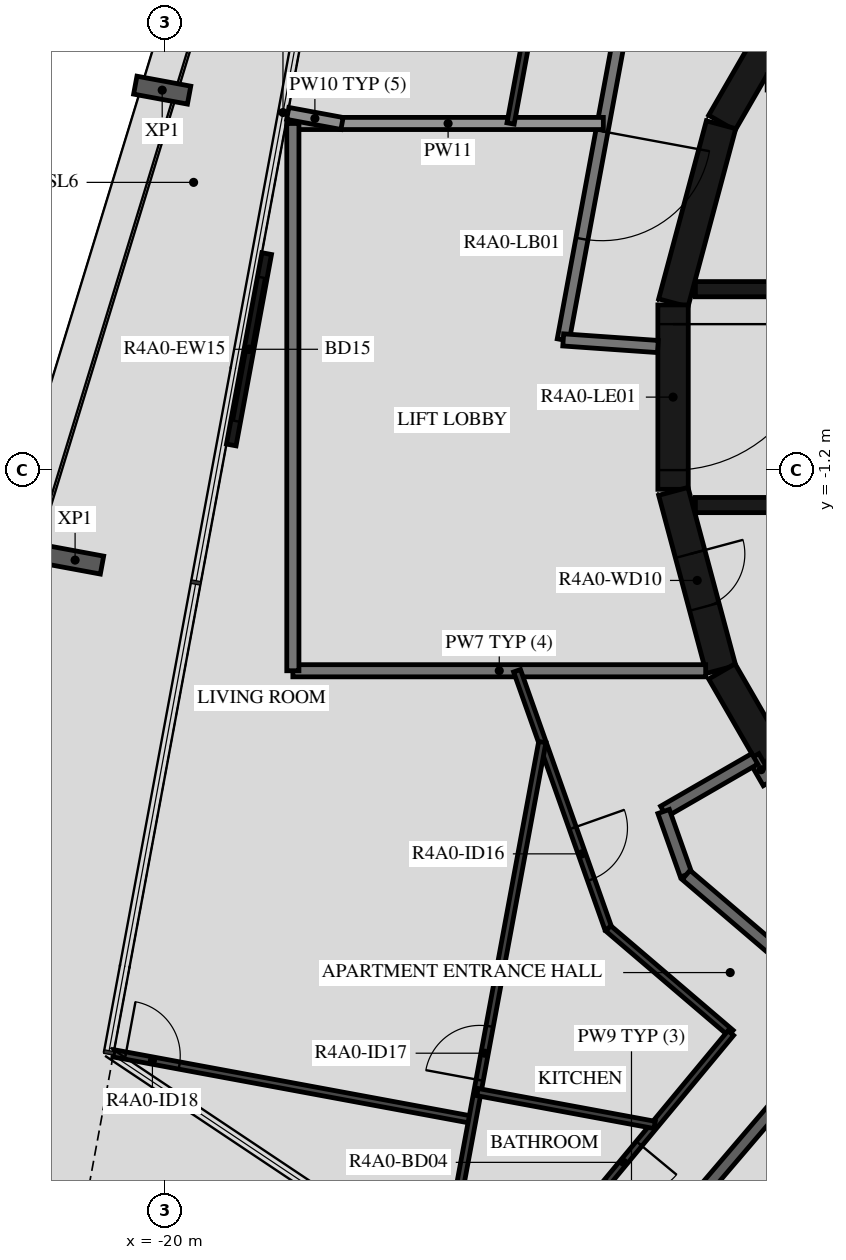
"""IFC4 building model, lengths in metres.
Left out: names, types, materials, properties, quantities, classifications, styles, units other than length and angle.
Written with IfcOpenShell. Run it as: python <this file> out.ifc"""

import sys

from ifc_helpers import new_model, si_unit, direction, frame, frame_2d, origin, origin_2d, place, context, subcontext, project, spatial, rectangle, i_section, extrude, element, fill, save


model = new_model("IFC4")
c1 = context("Model", 3, precision=1e-05, world=origin(), true_north=direction((0.0, 1.0)))
c2 = subcontext(c1, "Body", "Model", "MODEL_VIEW")
j1 = project(units=[si_unit("LENGTHUNIT", "METRE"), si_unit("PLANEANGLEUNIT", "RADIAN")], contexts=[c1])
p1 = place(None, origin())
s1 = spatial("IfcSite", under=j1, at=p1, CompositionType="ELEMENT")
p2 = place(p1, origin())
s2 = spatial("IfcBuilding", under=s1, at=p2, CompositionType="ELEMENT")
p3 = place(p2, frame((0.0, 0.0, 151.7)))
s3 = spatial("IfcBuildingStorey", under=s2, at=p3, CompositionType="ELEMENT", Elevation=151.7)
for number, where, z_axis, x_axis in (
    (1, (-20.049, 5.048, -0.45), (0.0, 0.0, 1.0), (0.182, 0.983, 0.0)),
    (2, (-21.481, -2.68, -0.45), (0.0, 0.0, 1.0), (0.182, 0.983, 0.0)),
):
    element("IfcColumn", number, at=place(p3, frame(where, z_axis=z_axis, x_axis=x_axis)), inside=s3, PredefinedType="COLUMN", context=c2, shape_type="SweptSolid", body=[
        extrude(i_section(OverallWidth=0.3, OverallDepth=0.9, WebThickness=0.019, FlangeThickness=0.035, FilletRadius=0.03, at=origin_2d()), origin(), (0.0, 0.0, 1.0), 3.57),
    ])
p4 = place(p3, frame((-18.33, 2.36, 0.0), z_axis=(0.0, 0.0, 1.0), x_axis=(-0.18226136951, -0.983250117307, 0.0)))
e3 = element("IfcWall", 3, at=p4, inside=s3, PredefinedType="STANDARD", context=c2, shape_type="SweptSolid", body=[
    extrude(rectangle(XDim=3.2, YDim=0.16, at=frame_2d((1.6, 0.0))), origin(), (0.0, 0.0, 1.0), 3.12),
])
p5 = place(p4, frame((0.4, 0.0, 0.0)))
e4 = element("IfcOpeningElement", 4, at=p5, cuts=e3, PredefinedType="OPENING", context=c2, shape_type="SweptSolid", body=[
    extrude(rectangle(XDim=2.4, YDim=2.4, at=frame_2d((1.2, 1.2))), frame((0.0, 0.09, 0.0), z_axis=(0.0, -1.0, 0.0), x_axis=(1.0, 0.0, 0.0)), (0.0, 0.0, 1.0), 0.18),
])
for number, where, z_axis, x_axis in (
    (5, (-9.329, 7.137, 0.0), (0.0, 0.0, 1.0), (-0.5, -0.866, 0.0)),
    (6, (-10.858, 4.479, 0.0), (0.0, 0.0, 1.0), (-0.259, -0.966, 0.0)),
):
    element("IfcWall", number, at=place(p3, frame(where, z_axis=z_axis, x_axis=x_axis)), inside=s3, PredefinedType="SHEAR", context=c2, shape_type="SweptSolid", body=[
        extrude(rectangle(XDim=3.033, YDim=0.5, at=frame_2d((1.516, 0.0))), origin(), (0.0, 0.0, 1.0), 3.12),
    ])
p6 = place(p3, frame((-11.647, 1.516, 0.0), z_axis=(0.0, 0.0, 1.0), x_axis=(0.0, -1.0, 0.0)))
e7 = element("IfcWall", 7, at=p6, inside=s3, PredefinedType="SHEAR", context=c2, shape_type="SweptSolid", body=[
    extrude(rectangle(XDim=3.033, YDim=0.5, at=frame_2d((1.516, 0.0))), origin(), (0.0, 0.0, 1.0), 3.12),
])
p7 = place(p6, frame((0.316, 0.0, 0.0)))
e8 = element("IfcOpeningElement", 8, at=p7, cuts=e7, PredefinedType="OPENING", context=c2, shape_type="SweptSolid", body=[
    extrude(rectangle(XDim=2.4, YDim=2.1, at=frame_2d((1.2, 1.05))), frame((0.0, 0.26, 0.0), z_axis=(0.0, -1.0, 0.0), x_axis=(1.0, 0.0, 0.0)), (0.0, 0.0, 1.0), 0.52),
])
p8 = place(p3, frame((-11.643, -1.55, 0.0), z_axis=(0.0, 0.0, 1.0), x_axis=(0.258734743916, -0.965948410781, 0.0)))
e9 = element("IfcWall", 9, at=p8, inside=s3, PredefinedType="SHEAR", context=c2, shape_type="SweptSolid", body=[
    extrude(rectangle(XDim=3.033, YDim=0.5, at=frame_2d((1.516, 0.0))), origin(), (0.0, 0.0, 1.0), 3.12),
])
p9 = place(p8, frame((1.066, 0.0, 0.0)))
e10 = element("IfcOpeningElement", 10, at=p9, cuts=e9, PredefinedType="OPENING", context=c2, shape_type="SweptSolid", body=[
    extrude(rectangle(XDim=0.9, YDim=2.1, at=frame_2d((0.45, 1.05))), frame((0.0, 0.26, 0.0), z_axis=(0.0, -1.0, 0.0), x_axis=(1.0, 0.0, 0.0)), (0.0, 0.0, 1.0), 0.52),
])
p10 = place(p3, frame((-10.845, -4.51, 0.0), z_axis=(0.0, 0.0, 1.0), x_axis=(0.500087131594, -0.865975092491, 0.0)))
e11 = element("IfcWall", 11, at=p10, inside=s3, PredefinedType="SHEAR", context=c2, shape_type="SweptSolid", body=[
    extrude(rectangle(XDim=3.033, YDim=0.5, at=frame_2d((1.516, 0.0))), origin(), (0.0, 0.0, 1.0), 3.12),
])
p11 = place(p3, frame((-11.28, 1.775, 0.0), z_axis=(0.0, 0.0, 1.0), x_axis=(1.0, 0.0, 0.0)))
e12 = element("IfcWall", 12, at=p11, inside=s3, PredefinedType="SHEAR", context=c2, shape_type="SweptSolid", body=[
    extrude(rectangle(XDim=14.38, YDim=0.25, at=frame_2d((7.19, 0.0))), origin(), (0.0, 0.0, 1.0), 3.12),
])
p12 = place(p11, frame((10.73, 0.0, 0.0)))
e13 = element("IfcOpeningElement", 13, at=p12, cuts=e12, PredefinedType="OPENING", context=c2, shape_type="SweptSolid", body=[
    extrude(rectangle(XDim=1.1, YDim=2.1, at=frame_2d((0.55, 1.05))), frame((0.0, 0.135, 0.0), z_axis=(0.0, -1.0, 0.0), x_axis=(1.0, 0.0, 0.0)), (0.0, 0.0, 1.0), 0.27),
])
p13 = place(p11, frame((12.88, 0.0, 0.0)))
e14 = element("IfcOpeningElement", 14, at=p13, cuts=e12, PredefinedType="OPENING", context=c2, shape_type="SweptSolid", body=[
    extrude(rectangle(XDim=1.1, YDim=2.1, at=frame_2d((0.55, 1.05))), frame((0.0, 0.135, 0.0), z_axis=(0.0, -1.0, 0.0), x_axis=(1.0, 0.0, 0.0)), (0.0, 0.0, 1.0), 0.27),
])
p14 = place(p11, frame((5.455, 0.0, 0.0)))
e15 = element("IfcOpeningElement", 15, at=p14, cuts=e12, PredefinedType="OPENING", context=c2, shape_type="SweptSolid", body=[
    extrude(rectangle(XDim=0.9, YDim=2.1, at=frame_2d((0.45, 1.05))), frame((0.0, 0.135, 0.0), z_axis=(0.0, -1.0, 0.0), x_axis=(1.0, 0.0, 0.0)), (0.0, 0.0, 1.0), 0.27),
])
p15 = place(p3, frame((-11.28, -1.775, 0.0), z_axis=(0.0, 0.0, 1.0), x_axis=(1.0, 0.0, 0.0)))
e16 = element("IfcWall", 16, at=p15, inside=s3, PredefinedType="SHEAR", context=c2, shape_type="SweptSolid", body=[
    extrude(rectangle(XDim=14.38, YDim=0.25, at=frame_2d((7.19, 0.0))), origin(), (0.0, 0.0, 1.0), 3.12),
])
p16 = place(p15, frame((2.03, 0.0, 0.0)))
e17 = element("IfcOpeningElement", 17, at=p16, cuts=e16, PredefinedType="OPENING", context=c2, shape_type="SweptSolid", body=[
    extrude(rectangle(XDim=1.3, YDim=2.1, at=frame_2d((0.65, 1.05))), frame((0.0, 0.135, 0.0), z_axis=(0.0, -1.0, 0.0), x_axis=(1.0, 0.0, 0.0)), (0.0, 0.0, 1.0), 0.27),
])
p17 = place(p15, frame((4.18, 0.0, 0.0)))
e18 = element("IfcOpeningElement", 18, at=p17, cuts=e16, PredefinedType="OPENING", context=c2, shape_type="SweptSolid", body=[
    extrude(rectangle(XDim=1.3, YDim=2.1, at=frame_2d((0.65, 1.05))), frame((0.0, 0.135, 0.0), z_axis=(0.0, -1.0, 0.0), x_axis=(1.0, 0.0, 0.0)), (0.0, 0.0, 1.0), 0.27),
])
p18 = place(p15, frame((12.88, 0.0, 0.0)))
e19 = element("IfcOpeningElement", 19, at=p18, cuts=e16, PredefinedType="OPENING", context=c2, shape_type="SweptSolid", body=[
    extrude(rectangle(XDim=1.1, YDim=2.1, at=frame_2d((0.55, 1.05))), frame((0.0, 0.135, 0.0), z_axis=(0.0, -1.0, 0.0), x_axis=(1.0, 0.0, 0.0)), (0.0, 0.0, 1.0), 0.27),
])
p19 = place(p15, frame((6.53, 0.0, 0.0)))
e20 = element("IfcOpeningElement", 20, at=p19, cuts=e16, PredefinedType="OPENING", context=c2, shape_type="SweptSolid", body=[
    extrude(rectangle(XDim=0.9, YDim=2.1, at=frame_2d((0.45, 1.05))), frame((0.0, 0.135, 0.0), z_axis=(0.0, -1.0, 0.0), x_axis=(1.0, 0.0, 0.0)), (0.0, 0.0, 1.0), 0.27),
])
p20 = place(p15, frame((8.68, 0.0, 0.0)))
e21 = element("IfcOpeningElement", 21, at=p20, cuts=e16, PredefinedType="OPENING", context=c2, shape_type="SweptSolid", body=[
    extrude(rectangle(XDim=0.9, YDim=2.1, at=frame_2d((0.45, 1.05))), frame((0.0, 0.135, 0.0), z_axis=(0.0, -1.0, 0.0), x_axis=(1.0, 0.0, 0.0)), (0.0, 0.0, 1.0), 0.27),
])
p21 = place(p15, frame((10.83, 0.0, 0.0)))
e22 = element("IfcOpeningElement", 22, at=p21, cuts=e16, PredefinedType="OPENING", context=c2, shape_type="SweptSolid", body=[
    extrude(rectangle(XDim=0.9, YDim=2.1, at=frame_2d((0.45, 1.05))), frame((0.0, 0.135, 0.0), z_axis=(0.0, -1.0, 0.0), x_axis=(1.0, 0.0, 0.0)), (0.0, 0.0, 1.0), 0.27),
])
p22 = place(p3, frame((-12.521, 5.972, 0.0), z_axis=(0.0, 0.0, 1.0), x_axis=(-0.182251559718, -0.983251935661, 0.0)))
e23 = element("IfcWall", 23, at=p22, inside=s3, PredefinedType="STANDARD", context=c2, shape_type="SweptSolid", body=[
    extrude(rectangle(XDim=5.117, YDim=0.2, at=frame_2d((2.559, 0.0))), origin(), (0.0, 0.0, 1.0), 3.12),
])
p23 = place(p22, frame((1.627, 0.0, 0.0)))
e24 = element("IfcOpeningElement", 24, at=p23, cuts=e23, PredefinedType="OPENING", context=c2, shape_type="SweptSolid", body=[
    extrude(rectangle(XDim=1.8, YDim=2.1, at=frame_2d((0.9, 1.05))), frame((0.0, 0.11, 0.0), z_axis=(0.0, -1.0, 0.0), x_axis=(1.0, 0.0, 0.0)), (0.0, 0.0, 1.0), 0.22),
])
p24 = place(p3, frame((-13.454, 0.941, 0.0), z_axis=(0.0, 0.0, 1.0), x_axis=(0.99755155062, -0.069934997354, 0.0)))
e25 = element("IfcWall", 25, at=p24, inside=s3, PredefinedType="STANDARD", context=c2, shape_type="SweptSolid", body=[
    extrude(rectangle(XDim=1.561, YDim=0.2, at=frame_2d((0.78, 0.0))), origin(), (0.0, 0.0, 1.0), 3.12),
])
p25 = place(p3, frame((-10.323, -5.914, 0.0), z_axis=(0.0, 0.0, 1.0), x_axis=(0.500137201729, -0.865946175837, 0.0)))
e26 = element("IfcWall", 26, at=p25, inside=s3, PredefinedType="STANDARD", context=c2, shape_type="SweptSolid", body=[
    extrude(rectangle(XDim=0.492, YDim=0.2, at=frame_2d((0.246, 0.0))), origin(), (0.0, 0.0, 1.0), 3.12),
])
p26 = place(p3, frame((-10.303, -5.949, 0.0), z_axis=(0.0, 0.0, 1.0), x_axis=(-0.866021168401, -0.500007335828, 0.0)))
e27 = element("IfcWall", 27, at=p26, inside=s3, PredefinedType="STANDARD", context=c2, shape_type="SweptSolid", body=[
    extrude(rectangle(XDim=1.731, YDim=0.2, at=frame_2d((0.865, 0.0))), origin(), (0.0, 0.0, 1.0), 3.12),
])
p27 = place(p3, frame((-11.802, -6.814, 0.0), z_axis=(0.0, 0.0, 1.0), x_axis=(0.333904297771, -0.942606980629, 0.0)))
e28 = element("IfcWall", 28, at=p27, inside=s3, PredefinedType="STANDARD", context=c2, shape_type="SweptSolid", body=[
    extrude(rectangle(XDim=1.107, YDim=0.2, at=frame_2d((0.553, 0.0))), origin(), (0.0, 0.0, 1.0), 3.12),
])
p28 = place(p3, frame((-11.433, -7.858, 0.0), z_axis=(0.0, 0.0, 1.0), x_axis=(0.760412154545, -0.649440801937, 0.0)))
e29 = element("IfcWall", 29, at=p28, inside=s3, PredefinedType="STANDARD", context=c2, shape_type="SweptSolid", body=[
    extrude(rectangle(XDim=7.181, YDim=0.2, at=frame_2d((3.59, 0.0))), origin(), (0.0, 0.0, 1.0), 3.12),
])
p29 = place(p28, frame((2.39, 0.0, 0.0)))
e30 = element("IfcOpeningElement", 30, at=p29, cuts=e29, PredefinedType="OPENING", context=c2, shape_type="SweptSolid", body=[
    extrude(rectangle(XDim=1.0, YDim=2.1, at=frame_2d((0.5, 1.05))), frame((0.0, 0.11, 0.0), z_axis=(0.0, -1.0, 0.0), x_axis=(1.0, 0.0, 0.0)), (0.0, 0.0, 1.0), 0.22),
])
p30 = place(p3, frame((-12.794, 4.5, 0.0), z_axis=(0.0, 0.0, 1.0), x_axis=(-1.0, 0.0, 0.0)))
e31 = element("IfcWall", 31, at=p30, inside=s3, PredefinedType="STANDARD", context=c2, shape_type="SweptSolid", body=[
    extrude(rectangle(XDim=5.106, YDim=0.2, at=frame_2d((2.553, 0.0))), origin(), (0.0, 0.0, 1.0), 2.73),
])
p31 = place(p3, frame((-17.9, -4.5, 0.0), z_axis=(0.0, 0.0, 1.0), x_axis=(1.0, 0.0, 0.0)))
e32 = element("IfcWall", 32, at=p31, inside=s3, PredefinedType="STANDARD", context=c2, shape_type="SweptSolid", body=[
    extrude(rectangle(XDim=6.789, YDim=0.2, at=frame_2d((3.394, 0.0))), origin(), (0.0, 0.0, 1.0), 3.12),
])
p32 = place(p3, frame((-17.9, 4.5, 0.0), z_axis=(0.0, 0.0, 1.0), x_axis=(0.0, -1.0, 0.0)))
e33 = element("IfcWall", 33, at=p32, inside=s3, PredefinedType="STANDARD", context=c2, shape_type="SweptSolid", body=[
    extrude(rectangle(XDim=9.0, YDim=0.2, at=frame_2d((4.5, 0.0))), origin(), (0.0, 0.0, 1.0), 3.12),
])
p33 = place(p3, frame((-17.984, 4.665, 0.0), z_axis=(0.0, 0.0, 1.0), x_axis=(0.98328378843, -0.182079629313, 0.0)))
e34 = element("IfcWall", 34, at=p33, inside=s3, PredefinedType="STANDARD", context=c2, shape_type="SweptSolid", body=[
    extrude(rectangle(XDim=0.908, YDim=0.2, at=frame_2d((0.454, 0.0))), origin(), (0.0, 0.0, 1.0), 2.73),
])
p34 = place(p3, frame((-11.838, -13.86, 0.0), z_axis=(0.0, 0.0, 1.0), x_axis=(0.64944503311, 0.760408540831, 0.0)))
e35 = element("IfcWall", 35, at=p34, inside=s3, PredefinedType="STANDARD", context=c2, shape_type="SweptSolid", body=[
    extrude(rectangle(XDim=4.827, YDim=0.2, at=frame_2d((2.414, 0.0))), origin(), (0.0, 0.0, 1.0), 3.12),
])
p35 = place(p3, frame((-13.923, 6.641, 0.0), z_axis=(0.0, 0.0, 1.0), x_axis=(-0.182209715759, -0.983259690765, 0.0)))
e36 = element("IfcWall", 36, at=p35, inside=s3, PredefinedType="PARTITIONING", context=c2, shape_type="SweptSolid", body=[
    extrude(rectangle(XDim=2.177, YDim=0.12, at=frame_2d((1.089, 0.0))), origin(), (0.0, 0.0, 1.0), 3.12),
])
p36 = place(p3, frame((-14.213, -4.5, 0.0), z_axis=(0.0, 0.0, 1.0), x_axis=(0.333802904542, -0.942642891513, 0.0)))
e37 = element("IfcWall", 37, at=p36, inside=s3, PredefinedType="PARTITIONING", context=c2, shape_type="SweptSolid", body=[
    extrude(rectangle(XDim=4.495, YDim=0.12, at=frame_2d((2.248, 0.0))), origin(), (0.0, 0.0, 1.0), 3.12),
])
p37 = place(p36, frame((2.744, 0.0, 0.0)))
e38 = element("IfcOpeningElement", 38, at=p37, cuts=e37, PredefinedType="OPENING", context=c2, shape_type="SweptSolid", body=[
    extrude(rectangle(XDim=0.9, YDim=2.1, at=frame_2d((0.45, 1.05))), frame((0.0, 0.07, 0.0), z_axis=(0.0, -1.0, 0.0), x_axis=(1.0, 0.0, 0.0)), (0.0, 0.0, 1.0), 0.14),
])
p38 = place(p3, frame((-12.713, -8.737, 0.0), z_axis=(0.0, 0.0, 1.0), x_axis=(0.760400223405, -0.649454771517, 0.0)))
e39 = element("IfcWall", 39, at=p38, inside=s3, PredefinedType="PARTITIONING", context=c2, shape_type="SweptSolid", body=[
    extrude(rectangle(XDim=2.649, YDim=0.12, at=frame_2d((1.325, 0.0))), origin(), (0.0, 0.0, 1.0), 3.12),
])
p39 = place(p3, frame((-10.698, -10.458, 0.0), z_axis=(0.0, 0.0, 1.0), x_axis=(-0.63830561059, -0.769783052223, 0.0)))
e40 = element("IfcWall", 40, at=p39, inside=s3, PredefinedType="PARTITIONING", context=c2, shape_type="SweptSolid", body=[
    extrude(rectangle(XDim=5.131, YDim=0.12, at=frame_2d((2.565, 0.0))), origin(), (0.0, 0.0, 1.0), 3.12),
])
p40 = place(p39, frame((2.363, 0.0, 0.0)))
e41 = element("IfcOpeningElement", 41, at=p40, cuts=e40, PredefinedType="OPENING", context=c2, shape_type="SweptSolid", body=[
    extrude(rectangle(XDim=0.8, YDim=2.1, at=frame_2d((0.4, 1.05))), frame((0.0, 0.07, 0.0), z_axis=(0.0, -1.0, 0.0), x_axis=(1.0, 0.0, 0.0)), (0.0, 0.0, 1.0), 0.14),
])
p41 = place(p3, frame((-20.849, -10.792, 0.0), z_axis=(0.0, 0.0, 1.0), x_axis=(0.983251500113, -0.182253909494, 0.0)))
e42 = element("IfcWall", 42, at=p41, inside=s3, PredefinedType="PARTITIONING", context=c2, shape_type="SweptSolid", body=[
    extrude(rectangle(XDim=6.0, YDim=0.12, at=frame_2d((3.0, 0.0))), origin(), (0.0, 0.0, 1.0), 2.73),
])
p42 = place(p41, frame((0.2, 0.0, 0.0)))
e43 = element("IfcOpeningElement", 43, at=p42, cuts=e42, PredefinedType="OPENING", context=c2, shape_type="SweptSolid", body=[
    extrude(rectangle(XDim=0.9, YDim=2.1, at=frame_2d((0.45, 1.05))), frame((0.0, 0.07, 0.0), z_axis=(0.0, -1.0, 0.0), x_axis=(1.0, 0.0, 0.0)), (0.0, 0.0, 1.0), 0.14),
])
p43 = place(p3, frame((-15.554, -15.149, 0.0), z_axis=(0.0, 0.0, 1.0), x_axis=(0.182237116667, 0.983254612656, 0.0)))
e44 = element("IfcWall", 44, at=p43, inside=s3, PredefinedType="PARTITIONING", context=c2, shape_type="SweptSolid", body=[
    extrude(rectangle(XDim=9.638, YDim=0.12, at=frame_2d((4.819, 0.0))), origin(), (0.0, 0.0, 1.0), 3.12),
])
p44 = place(p43, frame((3.984, 0.0, 0.0)))
e45 = element("IfcOpeningElement", 45, at=p44, cuts=e44, PredefinedType="OPENING", context=c2, shape_type="SweptSolid", body=[
    extrude(rectangle(XDim=0.9, YDim=2.1, at=frame_2d((0.45, 1.05))), frame((0.0, 0.07, 0.0), z_axis=(0.0, -1.0, 0.0), x_axis=(1.0, 0.0, 0.0)), (0.0, 0.0, 1.0), 0.14),
])
p45 = place(p3, frame((-14.865, -11.428, 0.0), z_axis=(0.0, 0.0, 1.0), x_axis=(0.983255224962, -0.182233812955, 0.0)))
e46 = element("IfcWall", 46, at=p45, inside=s3, PredefinedType="PARTITIONING", context=c2, shape_type="SweptSolid", body=[
    extrude(rectangle(XDim=2.963, YDim=0.12, at=frame_2d((1.482, 0.0))), origin(), (0.0, 0.0, 1.0), 3.12),
])
p46 = place(p5, origin())
e47 = element("IfcDoor", 47, at=p46, inside=s3, OperationType="DOUBLE_DOOR_SLIDING", PredefinedType="DOOR", context=c2, shape_type="SweptSolid", body=[
    extrude(rectangle(XDim=2.4, YDim=2.4, at=frame_2d((1.2, 1.2))), frame((0.0, 0.025, 0.0), z_axis=(0.0, -1.0, 0.0), x_axis=(1.0, 0.0, 0.0)), (0.0, 0.0, 1.0), 0.05),
])
fill(e4, e47)
p47 = place(p7, origin())
e48 = element("IfcDoor", 48, at=p47, inside=s3, OperationType="DOUBLE_DOOR_SINGLE_SWING", PredefinedType="DOOR", context=c2, shape_type="SweptSolid", body=[
    extrude(rectangle(XDim=2.4, YDim=2.1, at=frame_2d((1.2, 1.05))), frame((0.0, 0.025, 0.0), z_axis=(0.0, -1.0, 0.0), x_axis=(1.0, 0.0, 0.0)), (0.0, 0.0, 1.0), 0.05),
])
fill(e8, e48)
p48 = place(p9, origin())
e49 = element("IfcDoor", 49, at=p48, inside=s3, OperationType="SINGLE_SWING_RIGHT", PredefinedType="DOOR", context=c2, shape_type="SweptSolid", body=[
    extrude(rectangle(XDim=0.9, YDim=2.1, at=frame_2d((0.45, 1.05))), frame((0.0, 0.025, 0.0), z_axis=(0.0, -1.0, 0.0), x_axis=(1.0, 0.0, 0.0)), (0.0, 0.0, 1.0), 0.05),
])
fill(e10, e49)
p49 = place(p37, origin())
e50 = element("IfcDoor", 50, at=p49, inside=s3, OperationType="SINGLE_SWING_RIGHT", PredefinedType="DOOR", context=c2, shape_type="SweptSolid", body=[
    extrude(rectangle(XDim=0.9, YDim=2.1, at=frame_2d((0.45, 1.05))), frame((0.0, 0.025, 0.0), z_axis=(0.0, -1.0, 0.0), x_axis=(1.0, 0.0, 0.0)), (0.0, 0.0, 1.0), 0.05),
])
fill(e38, e50)
p50 = place(p40, origin())
e51 = element("IfcDoor", 51, at=p50, inside=s3, OperationType="SINGLE_SWING_RIGHT", PredefinedType="DOOR", context=c2, shape_type="SweptSolid", body=[
    extrude(rectangle(XDim=0.8, YDim=2.1, at=frame_2d((0.4, 1.05))), frame((0.0, 0.025, 0.0), z_axis=(0.0, -1.0, 0.0), x_axis=(1.0, 0.0, 0.0)), (0.0, 0.0, 1.0), 0.05),
])
fill(e41, e51)
p51 = place(p44, origin())
e52 = element("IfcDoor", 52, at=p51, inside=s3, OperationType="SINGLE_SWING_RIGHT", PredefinedType="DOOR", context=c2, shape_type="SweptSolid", body=[
    extrude(rectangle(XDim=0.9, YDim=2.1, at=frame_2d((0.45, 1.05))), frame((0.0, 0.025, 0.0), z_axis=(0.0, -1.0, 0.0), x_axis=(1.0, 0.0, 0.0)), (0.0, 0.0, 1.0), 0.05),
])
fill(e45, e52)
p52 = place(p42, origin())
e53 = element("IfcDoor", 53, at=p52, inside=s3, OperationType="SINGLE_SWING_RIGHT", PredefinedType="DOOR", context=c2, shape_type="SweptSolid", body=[
    extrude(rectangle(XDim=0.9, YDim=2.1, at=frame_2d((0.45, 1.05))), frame((0.0, 0.025, 0.0), z_axis=(0.0, -1.0, 0.0), x_axis=(1.0, 0.0, 0.0)), (0.0, 0.0, 1.0), 0.05),
])
fill(e43, e53)
p53 = place(p23, origin())
e54 = element("IfcDoor", 54, at=p53, inside=s3, OperationType="DOUBLE_DOOR_SINGLE_SWING", PredefinedType="DOOR", context=c2, shape_type="SweptSolid", body=[
    extrude(rectangle(XDim=1.8, YDim=2.1, at=frame_2d((0.9, 1.05))), frame((0.0, 0.025, 0.0), z_axis=(0.0, -1.0, 0.0), x_axis=(1.0, 0.0, 0.0)), (0.0, 0.0, 1.0), 0.05),
])
fill(e24, e54)
save(model, sys.argv[1])
